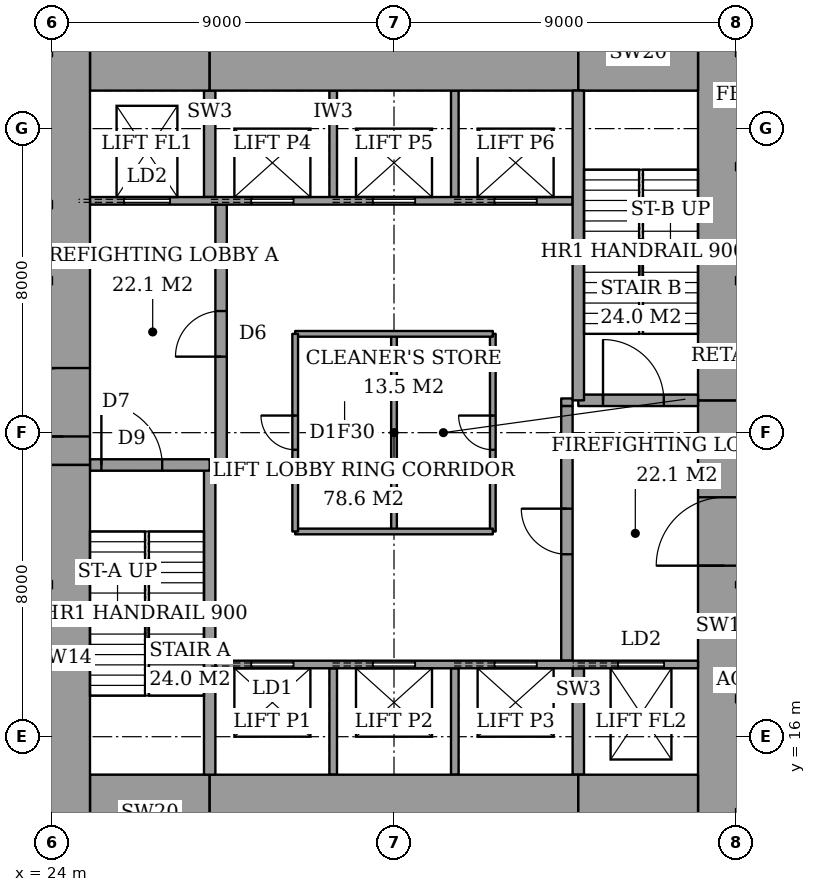
"""IFC4 building model, lengths in metres.
Left out: names, types, materials, properties, quantities, classifications, styles, units other than length and angle.
Written with IfcOpenShell. Run it as: python <this file> out.ifc"""

import sys

from ifc_helpers import new_model, si_unit, direction, frame, frame_2d, origin, place, context, subcontext, project, spatial, rectangle, extrude, element, fill, save


model = new_model("IFC4")
c1 = context("Model", 3, precision=1e-05, world=origin(), true_north=direction((0.0, 1.0)))
c2 = subcontext(c1, "Body", "Model", "MODEL_VIEW")
j1 = project(units=[si_unit("LENGTHUNIT", "METRE"), si_unit("PLANEANGLEUNIT", "RADIAN")], contexts=[c1])
p1 = place(None, origin())
s1 = spatial("IfcSite", under=j1, at=p1, CompositionType="ELEMENT")
p2 = place(p1, origin())
s2 = spatial("IfcBuilding", under=s1, at=p2, CompositionType="ELEMENT")
p3 = place(p2, origin())
s3 = spatial("IfcBuildingStorey", under=s2, at=p3, CompositionType="ELEMENT", Elevation=0.0)
p4 = place(p3, frame((25.0, 14.0, 0.0), z_axis=(0.0, 0.0, 1.0), x_axis=(1.0, 0.0, 0.0)))
e1 = element("IfcWall", 1, at=p4, inside=s3, PredefinedType="SHEAR", context=c2, shape_type="SweptSolid", body=[
    extrude(rectangle(XDim=3.15, YDim=2.0, at=frame_2d((1.575, 0.0))), origin(), (0.0, 0.0, 1.0), 6.0),
])
p5 = place(p3, frame((28.15, 14.0, 0.0), z_axis=(0.0, 0.0, 1.0), x_axis=(1.0, 0.0, 0.0)))
e2 = element("IfcWall", 2, at=p5, inside=s3, PredefinedType="SHEAR", context=c2, shape_type="SweptSolid", body=[
    extrude(rectangle(XDim=9.7, YDim=2.0, at=frame_2d((4.85, 0.0))), origin(), (0.0, 0.0, 1.0), 6.0),
])
for number, where, z_axis, x_axis in (
    (3, (37.85, 14.0, 0.0), (0.0, 0.0, 1.0), (1.0, 0.0, 0.0)),
    (4, (25.0, 34.0, 0.0), (0.0, 0.0, 1.0), (1.0, 0.0, 0.0)),
):
    element("IfcWall", number, at=place(p3, frame(where, z_axis=z_axis, x_axis=x_axis)), inside=s3, PredefinedType="SHEAR", context=c2, shape_type="SweptSolid", body=[
        extrude(rectangle(XDim=3.15, YDim=2.0, at=frame_2d((1.575, 0.0))), origin(), (0.0, 0.0, 1.0), 6.0),
    ])
p6 = place(p3, frame((28.15, 34.0, 0.0), z_axis=(0.0, 0.0, 1.0), x_axis=(1.0, 0.0, 0.0)))
e5 = element("IfcWall", 5, at=p6, inside=s3, PredefinedType="SHEAR", context=c2, shape_type="SweptSolid", body=[
    extrude(rectangle(XDim=9.7, YDim=2.0, at=frame_2d((4.85, 0.0))), origin(), (0.0, 0.0, 1.0), 6.0),
])
p7 = place(p3, frame((37.85, 34.0, 0.0), z_axis=(0.0, 0.0, 1.0), x_axis=(1.0, 0.0, 0.0)))
e6 = element("IfcWall", 6, at=p7, inside=s3, PredefinedType="SHEAR", context=c2, shape_type="SweptSolid", body=[
    extrude(rectangle(XDim=3.15, YDim=2.0, at=frame_2d((1.575, 0.0))), origin(), (0.0, 0.0, 1.0), 6.0),
])
p8 = place(p3, frame((24.3, 13.0, 0.0), z_axis=(0.0, 0.0, 1.0), x_axis=(0.0, 1.0, 0.0)))
e7 = element("IfcWall", 7, at=p8, inside=s3, PredefinedType="SHEAR", context=c2, shape_type="SweptSolid", body=[
    extrude(rectangle(XDim=10.15, YDim=1.4, at=frame_2d((5.075, 0.0))), origin(), (0.0, 0.0, 1.0), 6.0),
])
p9 = place(p3, frame((24.3, 23.15, 0.0), z_axis=(0.0, 0.0, 1.0), x_axis=(0.0, 1.0, 0.0)))
e8 = element("IfcWall", 8, at=p9, inside=s3, PredefinedType="SHEAR", context=c2, shape_type="SweptSolid", body=[
    extrude(rectangle(XDim=11.85, YDim=1.4, at=frame_2d((5.925, 0.0))), origin(), (0.0, 0.0, 1.0), 6.0),
])
p10 = place(p9, frame((0.75, 0.0, 0.0)))
e9 = element("IfcOpeningElement", 9, at=p10, cuts=e8, PredefinedType="OPENING", context=c2, shape_type="SweptSolid", body=[
    extrude(rectangle(XDim=1.8, YDim=2.4, at=frame_2d((0.9, 1.2))), frame((0.0, 0.71, 0.0), z_axis=(0.0, -1.0, 0.0), x_axis=(1.0, 0.0, 0.0)), (0.0, 0.0, 1.0), 1.42),
])
p11 = place(p3, frame((41.7, 13.0, 0.0), z_axis=(0.0, 0.0, 1.0), x_axis=(0.0, 1.0, 0.0)))
e10 = element("IfcWall", 10, at=p11, inside=s3, PredefinedType="SHEAR", context=c2, shape_type="SweptSolid", body=[
    extrude(rectangle(XDim=11.85, YDim=1.4, at=frame_2d((5.925, 0.0))), origin(), (0.0, 0.0, 1.0), 6.0),
])
p12 = place(p11, frame((7.5, 0.0, 0.0)))
e11 = element("IfcOpeningElement", 11, at=p12, cuts=e10, PredefinedType="OPENING", context=c2, shape_type="SweptSolid", body=[
    extrude(rectangle(XDim=1.8, YDim=2.4, at=frame_2d((0.9, 1.2))), frame((0.0, 0.71, 0.0), z_axis=(0.0, -1.0, 0.0), x_axis=(1.0, 0.0, 0.0)), (0.0, 0.0, 1.0), 1.42),
])
p13 = place(p3, frame((41.7, 24.85, 0.0), z_axis=(0.0, 0.0, 1.0), x_axis=(0.0, 1.0, 0.0)))
e12 = element("IfcWall", 12, at=p13, inside=s3, PredefinedType="SHEAR", context=c2, shape_type="SweptSolid", body=[
    extrude(rectangle(XDim=10.15, YDim=1.4, at=frame_2d((5.075, 0.0))), origin(), (0.0, 0.0, 1.0), 6.0),
])
p14 = place(p3, frame((28.15, 15.0, 0.0), z_axis=(0.0, 0.0, 1.0), x_axis=(0.0, 1.0, 0.0)))
e13 = element("IfcWall", 13, at=p14, inside=s3, PredefinedType="SHEAR", context=c2, shape_type="SweptSolid", body=[
    extrude(rectangle(XDim=8.15, YDim=0.3, at=frame_2d((4.075, 0.0))), origin(), (0.0, 0.0, 1.0), 6.0),
])
p15 = place(p3, frame((25.0, 23.15, 0.0), z_axis=(0.0, 0.0, 1.0), x_axis=(1.0, 0.0, 0.0)))
e14 = element("IfcWall", 14, at=p15, inside=s3, PredefinedType="SHEAR", context=c2, shape_type="SweptSolid", body=[
    extrude(rectangle(XDim=3.15, YDim=0.3, at=frame_2d((1.575, 0.0))), origin(), (0.0, 0.0, 1.0), 6.0),
])
p16 = place(p15, frame((0.3, 0.0, 0.0)))
e15 = element("IfcOpeningElement", 15, at=p16, cuts=e14, PredefinedType="OPENING", context=c2, shape_type="SweptSolid", body=[
    extrude(rectangle(XDim=1.6, YDim=2.1, at=frame_2d((0.8, 1.05))), frame((0.0, 0.16, 0.0), z_axis=(0.0, -1.0, 0.0), x_axis=(1.0, 0.0, 0.0)), (0.0, 0.0, 1.0), 0.32),
])
p17 = place(p3, frame((37.85, 24.85, 0.0), z_axis=(0.0, 0.0, 1.0), x_axis=(0.0, 1.0, 0.0)))
e16 = element("IfcWall", 16, at=p17, inside=s3, PredefinedType="SHEAR", context=c2, shape_type="SweptSolid", body=[
    extrude(rectangle(XDim=8.15, YDim=0.3, at=frame_2d((4.075, 0.0))), origin(), (0.0, 0.0, 1.0), 6.0),
])
p18 = place(p3, frame((37.85, 24.85, 0.0), z_axis=(0.0, 0.0, 1.0), x_axis=(1.0, 0.0, 0.0)))
e17 = element("IfcWall", 17, at=p18, inside=s3, PredefinedType="SHEAR", context=c2, shape_type="SweptSolid", body=[
    extrude(rectangle(XDim=3.15, YDim=0.3, at=frame_2d((1.575, 0.0))), origin(), (0.0, 0.0, 1.0), 6.0),
])
p19 = place(p18, frame((0.65, 0.0, 0.0)))
e18 = element("IfcOpeningElement", 18, at=p19, cuts=e17, PredefinedType="OPENING", context=c2, shape_type="SweptSolid", body=[
    extrude(rectangle(XDim=1.6, YDim=2.1, at=frame_2d((0.8, 1.05))), frame((0.0, 0.16, 0.0), z_axis=(0.0, -1.0, 0.0), x_axis=(1.0, 0.0, 0.0)), (0.0, 0.0, 1.0), 0.32),
])
p20 = place(p3, frame((28.45, 23.3, 0.0), z_axis=(0.0, 0.0, 1.0), x_axis=(0.0, 1.0, 0.0)))
e19 = element("IfcWall", 19, at=p20, inside=s3, PredefinedType="PARTITIONING", context=c2, shape_type="SweptSolid", body=[
    extrude(rectangle(XDim=6.7, YDim=0.3, at=frame_2d((3.35, 0.0))), origin(), (0.0, 0.0, 1.0), 6.0),
])
p21 = place(p20, frame((2.7, 0.0, 0.0)))
e20 = element("IfcOpeningElement", 20, at=p21, cuts=e19, PredefinedType="OPENING", context=c2, shape_type="SweptSolid", body=[
    extrude(rectangle(XDim=1.2, YDim=2.1, at=frame_2d((0.6, 1.05))), frame((0.0, 0.16, 0.0), z_axis=(0.0, -1.0, 0.0), x_axis=(1.0, 0.0, 0.0)), (0.0, 0.0, 1.0), 0.32),
])
p22 = place(p3, frame((37.55, 18.0, 0.0), z_axis=(0.0, 0.0, 1.0), x_axis=(0.0, 1.0, 0.0)))
e21 = element("IfcWall", 21, at=p22, inside=s3, PredefinedType="PARTITIONING", context=c2, shape_type="SweptSolid", body=[
    extrude(rectangle(XDim=6.7, YDim=0.3, at=frame_2d((3.35, 0.0))), origin(), (0.0, 0.0, 1.0), 6.0),
])
p23 = place(p22, frame((2.8, 0.0, 0.0)))
e22 = element("IfcOpeningElement", 22, at=p23, cuts=e21, PredefinedType="OPENING", context=c2, shape_type="SweptSolid", body=[
    extrude(rectangle(XDim=1.2, YDim=2.1, at=frame_2d((0.6, 1.05))), frame((0.0, 0.16, 0.0), z_axis=(0.0, -1.0, 0.0), x_axis=(1.0, 0.0, 0.0)), (0.0, 0.0, 1.0), 0.32),
])
p24 = place(p3, frame((28.3, 17.9, 0.0), z_axis=(0.0, 0.0, 1.0), x_axis=(1.0, 0.0, 0.0)))
e23 = element("IfcWall", 23, at=p24, inside=s3, PredefinedType="PARTITIONING", context=c2, shape_type="SweptSolid", body=[
    extrude(rectangle(XDim=12.7, YDim=0.2, at=frame_2d((6.35, 0.0))), origin(), (0.0, 0.0, 1.0), 6.0),
])
p25 = place(p24, frame((0.95, 0.0, 0.0)))
e24 = element("IfcOpeningElement", 24, at=p25, cuts=e23, PredefinedType="OPENING", context=c2, shape_type="SweptSolid", body=[
    extrude(rectangle(XDim=1.1, YDim=2.1, at=frame_2d((0.55, 1.05))), frame((0.0, 0.11, 0.0), z_axis=(0.0, -1.0, 0.0), x_axis=(1.0, 0.0, 0.0)), (0.0, 0.0, 1.0), 0.22),
])
p26 = place(p24, frame((4.15, 0.0, 0.0)))
e25 = element("IfcOpeningElement", 25, at=p26, cuts=e23, PredefinedType="OPENING", context=c2, shape_type="SweptSolid", body=[
    extrude(rectangle(XDim=1.1, YDim=2.1, at=frame_2d((0.55, 1.05))), frame((0.0, 0.11, 0.0), z_axis=(0.0, -1.0, 0.0), x_axis=(1.0, 0.0, 0.0)), (0.0, 0.0, 1.0), 0.22),
])
p27 = place(p24, frame((7.35, 0.0, 0.0)))
e26 = element("IfcOpeningElement", 26, at=p27, cuts=e23, PredefinedType="OPENING", context=c2, shape_type="SweptSolid", body=[
    extrude(rectangle(XDim=1.1, YDim=2.1, at=frame_2d((0.55, 1.05))), frame((0.0, 0.11, 0.0), z_axis=(0.0, -1.0, 0.0), x_axis=(1.0, 0.0, 0.0)), (0.0, 0.0, 1.0), 0.22),
])
p28 = place(p24, frame((10.6, 0.0, 0.0)))
e27 = element("IfcOpeningElement", 27, at=p28, cuts=e23, PredefinedType="OPENING", context=c2, shape_type="SweptSolid", body=[
    extrude(rectangle(XDim=1.2, YDim=2.1, at=frame_2d((0.6, 1.05))), frame((0.0, 0.11, 0.0), z_axis=(0.0, -1.0, 0.0), x_axis=(1.0, 0.0, 0.0)), (0.0, 0.0, 1.0), 0.22),
])
p29 = place(p3, frame((25.0, 30.1, 0.0), z_axis=(0.0, 0.0, 1.0), x_axis=(1.0, 0.0, 0.0)))
e28 = element("IfcWall", 28, at=p29, inside=s3, PredefinedType="PARTITIONING", context=c2, shape_type="SweptSolid", body=[
    extrude(rectangle(XDim=12.7, YDim=0.2, at=frame_2d((6.35, 0.0))), origin(), (0.0, 0.0, 1.0), 6.0),
])
p30 = place(p29, frame((4.25, 0.0, 0.0)))
e29 = element("IfcOpeningElement", 29, at=p30, cuts=e28, PredefinedType="OPENING", context=c2, shape_type="SweptSolid", body=[
    extrude(rectangle(XDim=1.1, YDim=2.1, at=frame_2d((0.55, 1.05))), frame((0.0, 0.11, 0.0), z_axis=(0.0, -1.0, 0.0), x_axis=(1.0, 0.0, 0.0)), (0.0, 0.0, 1.0), 0.22),
])
p31 = place(p29, frame((7.45, 0.0, 0.0)))
e30 = element("IfcOpeningElement", 30, at=p31, cuts=e28, PredefinedType="OPENING", context=c2, shape_type="SweptSolid", body=[
    extrude(rectangle(XDim=1.1, YDim=2.1, at=frame_2d((0.55, 1.05))), frame((0.0, 0.11, 0.0), z_axis=(0.0, -1.0, 0.0), x_axis=(1.0, 0.0, 0.0)), (0.0, 0.0, 1.0), 0.22),
])
p32 = place(p29, frame((10.65, 0.0, 0.0)))
e31 = element("IfcOpeningElement", 31, at=p32, cuts=e28, PredefinedType="OPENING", context=c2, shape_type="SweptSolid", body=[
    extrude(rectangle(XDim=1.1, YDim=2.1, at=frame_2d((0.55, 1.05))), frame((0.0, 0.11, 0.0), z_axis=(0.0, -1.0, 0.0), x_axis=(1.0, 0.0, 0.0)), (0.0, 0.0, 1.0), 0.22),
])
p33 = place(p29, frame((0.9, 0.0, 0.0)))
e32 = element("IfcOpeningElement", 32, at=p33, cuts=e28, PredefinedType="OPENING", context=c2, shape_type="SweptSolid", body=[
    extrude(rectangle(XDim=1.2, YDim=2.1, at=frame_2d((0.6, 1.05))), frame((0.0, 0.11, 0.0), z_axis=(0.0, -1.0, 0.0), x_axis=(1.0, 0.0, 0.0)), (0.0, 0.0, 1.0), 0.22),
])
for number, where, z_axis, x_axis in (
    (33, (31.4, 15.0, 0.0), (0.0, 0.0, 1.0), (0.0, 1.0, 0.0)),
    (34, (34.6, 15.0, 0.0), (0.0, 0.0, 1.0), (0.0, 1.0, 0.0)),
):
    element("IfcWall", number, at=place(p3, frame(where, z_axis=z_axis, x_axis=x_axis)), inside=s3, PredefinedType="PARTITIONING", context=c2, shape_type="SweptSolid", body=[
        extrude(rectangle(XDim=2.8, YDim=0.2, at=frame_2d((1.4, 0.0))), origin(), (0.0, 0.0, 1.0), 6.0),
    ])
p34 = place(p3, frame((37.85, 15.0, 0.0), z_axis=(0.0, 0.0, 1.0), x_axis=(0.0, 1.0, 0.0)))
e35 = element("IfcWall", 35, at=p34, inside=s3, PredefinedType="SHEAR", context=c2, shape_type="SweptSolid", body=[
    extrude(rectangle(XDim=2.8, YDim=0.3, at=frame_2d((1.4, 0.0))), origin(), (0.0, 0.0, 1.0), 6.0),
])
for number, where, z_axis, x_axis in (
    (36, (31.4, 30.2, 0.0), (0.0, 0.0, 1.0), (0.0, 1.0, 0.0)),
    (37, (34.6, 30.2, 0.0), (0.0, 0.0, 1.0), (0.0, 1.0, 0.0)),
):
    element("IfcWall", number, at=place(p3, frame(where, z_axis=z_axis, x_axis=x_axis)), inside=s3, PredefinedType="PARTITIONING", context=c2, shape_type="SweptSolid", body=[
        extrude(rectangle(XDim=2.8, YDim=0.2, at=frame_2d((1.4, 0.0))), origin(), (0.0, 0.0, 1.0), 6.0),
    ])
p35 = place(p3, frame((28.15, 30.2, 0.0), z_axis=(0.0, 0.0, 1.0), x_axis=(0.0, 1.0, 0.0)))
e38 = element("IfcWall", 38, at=p35, inside=s3, PredefinedType="SHEAR", context=c2, shape_type="SweptSolid", body=[
    extrude(rectangle(XDim=2.8, YDim=0.3, at=frame_2d((1.4, 0.0))), origin(), (0.0, 0.0, 1.0), 6.0),
])
for number, where, z_axis, x_axis in (
    (39, (28.3, 23.2, 0.0), (0.0, 0.0, 1.0), (1.0, 0.0, 0.0)),
    (40, (37.4, 24.8, 0.0), (0.0, 0.0, 1.0), (1.0, 0.0, 0.0)),
):
    element("IfcWall", number, at=place(p3, frame(where, z_axis=z_axis, x_axis=x_axis)), inside=s3, PredefinedType="PARTITIONING", context=c2, shape_type="SweptSolid", body=[
        extrude(rectangle(XDim=0.3, YDim=0.2, at=frame_2d((0.15, 0.0))), origin(), (0.0, 0.0, 1.0), 6.0),
    ])
for number, where, z_axis, x_axis in (
    (41, (30.4, 21.4, 0.0), (0.0, 0.0, 1.0), (1.0, 0.0, 0.0)),
    (42, (30.4, 26.6, 0.0), (0.0, 0.0, 1.0), (1.0, 0.0, 0.0)),
):
    element("IfcWall", number, at=place(p3, frame(where, z_axis=z_axis, x_axis=x_axis)), inside=s3, PredefinedType="PARTITIONING", context=c2, shape_type="SweptSolid", body=[
        extrude(rectangle(XDim=5.2, YDim=0.15, at=frame_2d((2.6, 0.0))), origin(), (0.0, 0.0, 1.0), 5.7),
    ])
p36 = place(p3, frame((30.4, 21.4, 0.0), z_axis=(0.0, 0.0, 1.0), x_axis=(0.0, 1.0, 0.0)))
e43 = element("IfcWall", 43, at=p36, inside=s3, PredefinedType="PARTITIONING", context=c2, shape_type="SweptSolid", body=[
    extrude(rectangle(XDim=5.2, YDim=0.15, at=frame_2d((2.6, 0.0))), origin(), (0.0, 0.0, 1.0), 5.7),
])
p37 = place(p36, frame((2.15, 0.0, 0.0)))
e44 = element("IfcOpeningElement", 44, at=p37, cuts=e43, PredefinedType="OPENING", context=c2, shape_type="SweptSolid", body=[
    extrude(rectangle(XDim=0.9, YDim=2.1, at=frame_2d((0.45, 1.05))), frame((0.0, 0.085, 0.0), z_axis=(0.0, -1.0, 0.0), x_axis=(1.0, 0.0, 0.0)), (0.0, 0.0, 1.0), 0.17),
])
p38 = place(p3, frame((35.6, 21.4, 0.0), z_axis=(0.0, 0.0, 1.0), x_axis=(0.0, 1.0, 0.0)))
e45 = element("IfcWall", 45, at=p38, inside=s3, PredefinedType="PARTITIONING", context=c2, shape_type="SweptSolid", body=[
    extrude(rectangle(XDim=5.2, YDim=0.15, at=frame_2d((2.6, 0.0))), origin(), (0.0, 0.0, 1.0), 5.7),
])
p39 = place(p38, frame((2.15, 0.0, 0.0)))
e46 = element("IfcOpeningElement", 46, at=p39, cuts=e45, PredefinedType="OPENING", context=c2, shape_type="SweptSolid", body=[
    extrude(rectangle(XDim=0.9, YDim=2.1, at=frame_2d((0.45, 1.05))), frame((0.0, 0.085, 0.0), z_axis=(0.0, -1.0, 0.0), x_axis=(1.0, 0.0, 0.0)), (0.0, 0.0, 1.0), 0.17),
])
p40 = place(p3, frame((33.0, 21.4, 0.0), z_axis=(0.0, 0.0, 1.0), x_axis=(0.0, 1.0, 0.0)))
e47 = element("IfcWall", 47, at=p40, inside=s3, PredefinedType="PARTITIONING", context=c2, shape_type="SweptSolid", body=[
    extrude(rectangle(XDim=5.2, YDim=0.15, at=frame_2d((2.6, 0.0))), origin(), (0.0, 0.0, 1.0), 5.7),
])
p41 = place(p16, origin())
e48 = element("IfcDoor", 48, at=p41, inside=s3, OperationType="DOUBLE_DOOR_SINGLE_SWING", PredefinedType="DOOR", context=c2, shape_type="SweptSolid", body=[
    extrude(rectangle(XDim=1.6, YDim=2.1, at=frame_2d((0.8, 1.05))), frame((0.0, 0.025, 0.0), z_axis=(0.0, -1.0, 0.0), x_axis=(1.0, 0.0, 0.0)), (0.0, 0.0, 1.0), 0.05),
])
fill(e15, e48)
p42 = place(p19, origin())
e49 = element("IfcDoor", 49, at=p42, inside=s3, OperationType="DOUBLE_DOOR_SINGLE_SWING", PredefinedType="DOOR", context=c2, shape_type="SweptSolid", body=[
    extrude(rectangle(XDim=1.6, YDim=2.1, at=frame_2d((0.8, 1.05))), frame((0.0, 0.025, 0.0), z_axis=(0.0, -1.0, 0.0), x_axis=(1.0, 0.0, 0.0)), (0.0, 0.0, 1.0), 0.05),
])
fill(e18, e49)
p43 = place(p21, origin())
e50 = element("IfcDoor", 50, at=p43, inside=s3, OperationType="SINGLE_SWING_RIGHT", PredefinedType="DOOR", context=c2, shape_type="SweptSolid", body=[
    extrude(rectangle(XDim=1.2, YDim=2.1, at=frame_2d((0.6, 1.05))), frame((0.0, 0.025, 0.0), z_axis=(0.0, -1.0, 0.0), x_axis=(1.0, 0.0, 0.0)), (0.0, 0.0, 1.0), 0.05),
])
fill(e20, e50)
p44 = place(p23, origin())
e51 = element("IfcDoor", 51, at=p44, inside=s3, OperationType="SINGLE_SWING_LEFT", PredefinedType="DOOR", context=c2, shape_type="SweptSolid", body=[
    extrude(rectangle(XDim=1.2, YDim=2.1, at=frame_2d((0.6, 1.05))), frame((0.0, 0.025, 0.0), z_axis=(0.0, -1.0, 0.0), x_axis=(1.0, 0.0, 0.0)), (0.0, 0.0, 1.0), 0.05),
])
fill(e22, e51)
p45 = place(p10, origin())
e52 = element("IfcDoor", 52, at=p45, inside=s3, OperationType="DOUBLE_DOOR_DOUBLE_SWING", PredefinedType="DOOR", context=c2, shape_type="SweptSolid", body=[
    extrude(rectangle(XDim=1.8, YDim=2.4, at=frame_2d((0.9, 1.2))), frame((0.0, -0.175, 0.0), z_axis=(0.0, -1.0, 0.0), x_axis=(1.0, 0.0, 0.0)), (0.0, 0.0, 1.0), 0.05),
])
fill(e9, e52)
p46 = place(p12, origin())
e53 = element("IfcDoor", 53, at=p46, inside=s3, OperationType="DOUBLE_DOOR_DOUBLE_SWING", PredefinedType="DOOR", context=c2, shape_type="SweptSolid", body=[
    extrude(rectangle(XDim=1.8, YDim=2.4, at=frame_2d((0.9, 1.2))), frame((0.0, 0.225, 0.0), z_axis=(0.0, -1.0, 0.0), x_axis=(1.0, 0.0, 0.0)), (0.0, 0.0, 1.0), 0.05),
])
fill(e11, e53)
p47 = place(p37, origin())
e54 = element("IfcDoor", 54, at=p47, inside=s3, OperationType="SINGLE_SWING_LEFT", PredefinedType="DOOR", context=c2, shape_type="SweptSolid", body=[
    extrude(rectangle(XDim=0.9, YDim=2.1, at=frame_2d((0.45, 1.05))), frame((0.0, 0.025, 0.0), z_axis=(0.0, -1.0, 0.0), x_axis=(1.0, 0.0, 0.0)), (0.0, 0.0, 1.0), 0.05),
])
fill(e44, e54)
p48 = place(p39, origin())
e55 = element("IfcDoor", 55, at=p48, inside=s3, OperationType="SINGLE_SWING_LEFT", PredefinedType="DOOR", context=c2, shape_type="SweptSolid", body=[
    extrude(rectangle(XDim=0.9, YDim=2.1, at=frame_2d((0.45, 1.05))), frame((0.0, 0.025, 0.0), z_axis=(0.0, -1.0, 0.0), x_axis=(1.0, 0.0, 0.0)), (0.0, 0.0, 1.0), 0.05),
])
fill(e46, e55)
p49 = place(p25, origin())
e56 = element("IfcDoor", 56, at=p49, inside=s3, OperationType="SLIDING_TO_LEFT", PredefinedType="DOOR", context=c2, shape_type="SweptSolid", body=[
    extrude(rectangle(XDim=1.1, YDim=2.1, at=frame_2d((0.55, 1.05))), frame((0.0, 0.025, 0.0), z_axis=(0.0, -1.0, 0.0), x_axis=(1.0, 0.0, 0.0)), (0.0, 0.0, 1.0), 0.05),
])
fill(e24, e56)
p50 = place(p26, origin())
e57 = element("IfcDoor", 57, at=p50, inside=s3, OperationType="SLIDING_TO_LEFT", PredefinedType="DOOR", context=c2, shape_type="SweptSolid", body=[
    extrude(rectangle(XDim=1.1, YDim=2.1, at=frame_2d((0.55, 1.05))), frame((0.0, 0.025, 0.0), z_axis=(0.0, -1.0, 0.0), x_axis=(1.0, 0.0, 0.0)), (0.0, 0.0, 1.0), 0.05),
])
fill(e25, e57)
p51 = place(p27, origin())
e58 = element("IfcDoor", 58, at=p51, inside=s3, OperationType="SLIDING_TO_LEFT", PredefinedType="DOOR", context=c2, shape_type="SweptSolid", body=[
    extrude(rectangle(XDim=1.1, YDim=2.1, at=frame_2d((0.55, 1.05))), frame((0.0, 0.025, 0.0), z_axis=(0.0, -1.0, 0.0), x_axis=(1.0, 0.0, 0.0)), (0.0, 0.0, 1.0), 0.05),
])
fill(e26, e58)
p52 = place(p30, origin())
e59 = element("IfcDoor", 59, at=p52, inside=s3, OperationType="SLIDING_TO_LEFT", PredefinedType="DOOR", context=c2, shape_type="SweptSolid", body=[
    extrude(rectangle(XDim=1.1, YDim=2.1, at=frame_2d((0.55, 1.05))), frame((0.0, 0.025, 0.0), z_axis=(0.0, -1.0, 0.0), x_axis=(1.0, 0.0, 0.0)), (0.0, 0.0, 1.0), 0.05),
])
fill(e29, e59)
p53 = place(p31, origin())
e60 = element("IfcDoor", 60, at=p53, inside=s3, OperationType="SLIDING_TO_LEFT", PredefinedType="DOOR", context=c2, shape_type="SweptSolid", body=[
    extrude(rectangle(XDim=1.1, YDim=2.1, at=frame_2d((0.55, 1.05))), frame((0.0, 0.025, 0.0), z_axis=(0.0, -1.0, 0.0), x_axis=(1.0, 0.0, 0.0)), (0.0, 0.0, 1.0), 0.05),
])
fill(e30, e60)
p54 = place(p32, origin())
e61 = element("IfcDoor", 61, at=p54, inside=s3, OperationType="SLIDING_TO_LEFT", PredefinedType="DOOR", context=c2, shape_type="SweptSolid", body=[
    extrude(rectangle(XDim=1.1, YDim=2.1, at=frame_2d((0.55, 1.05))), frame((0.0, 0.025, 0.0), z_axis=(0.0, -1.0, 0.0), x_axis=(1.0, 0.0, 0.0)), (0.0, 0.0, 1.0), 0.05),
])
fill(e31, e61)
p55 = place(p33, origin())
e62 = element("IfcDoor", 62, at=p55, inside=s3, OperationType="SLIDING_TO_LEFT", PredefinedType="DOOR", context=c2, shape_type="SweptSolid", body=[
    extrude(rectangle(XDim=1.2, YDim=2.1, at=frame_2d((0.6, 1.05))), frame((0.0, 0.025, 0.0), z_axis=(0.0, -1.0, 0.0), x_axis=(1.0, 0.0, 0.0)), (0.0, 0.0, 1.0), 0.05),
])
fill(e32, e62)
p56 = place(p28, origin())
e63 = element("IfcDoor", 63, at=p56, inside=s3, OperationType="SLIDING_TO_LEFT", PredefinedType="DOOR", context=c2, shape_type="SweptSolid", body=[
    extrude(rectangle(XDim=1.2, YDim=2.1, at=frame_2d((0.6, 1.05))), frame((0.0, 0.025, 0.0), z_axis=(0.0, -1.0, 0.0), x_axis=(1.0, 0.0, 0.0)), (0.0, 0.0, 1.0), 0.05),
])
fill(e27, e63)
save(model, sys.argv[1])
